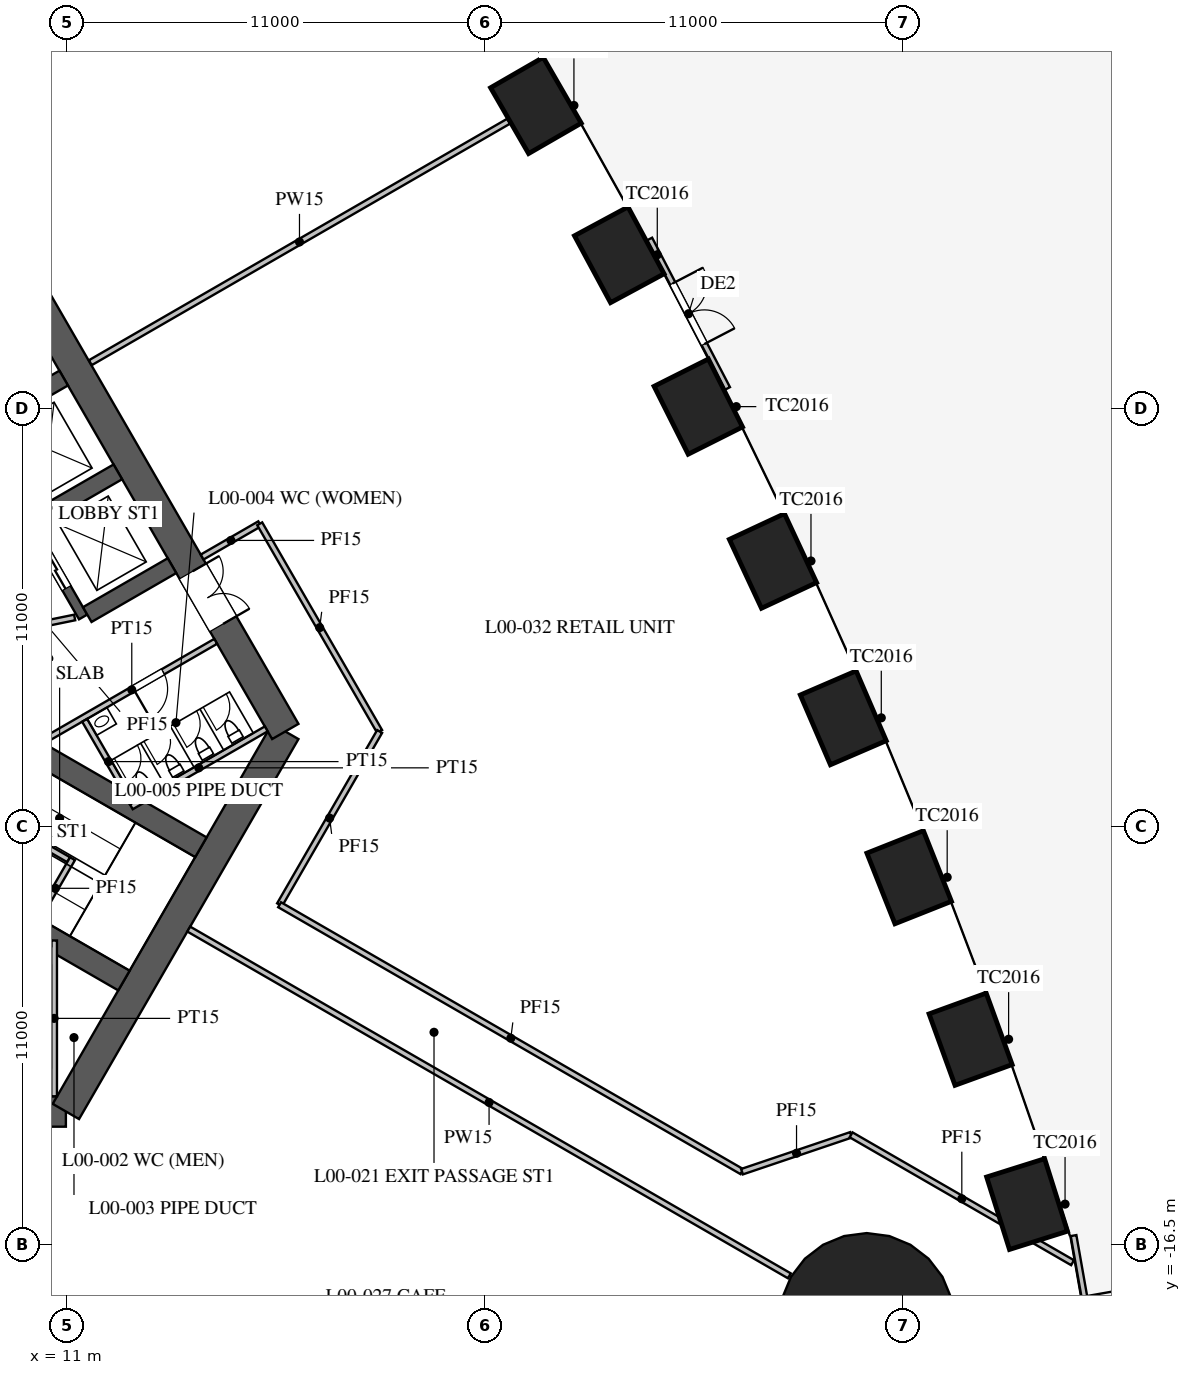
"""IFC4 building model, lengths in metres.
Left out: names, types, materials, properties, quantities, classifications, styles, units other than length and angle.
Written with IfcOpenShell. Run it as: python <this file> out.ifc"""

import sys

from ifc_helpers import new_model, si_unit, direction, frame, frame_2d, origin, origin_2d, place, context, subcontext, project, spatial, polyline, rectangle, circle, outline, extrude, element, fill, save


model = new_model("IFC4")
c1 = context("Model", 3, precision=1e-05, world=origin(), true_north=direction((0.0, 1.0)))
c2 = subcontext(c1, "Body", "Model", "MODEL_VIEW")
j1 = project(units=[si_unit("LENGTHUNIT", "METRE"), si_unit("PLANEANGLEUNIT", "RADIAN")], contexts=[c1])
p1 = place(None, origin())
s1 = spatial("IfcSite", under=j1, at=p1, CompositionType="ELEMENT")
p2 = place(p1, origin())
s2 = spatial("IfcBuilding", under=s1, at=p2, CompositionType="ELEMENT")
p3 = place(p2, origin())
s3 = spatial("IfcBuildingStorey", under=s2, at=p3, CompositionType="ELEMENT", Elevation=0.0)
for number, where, z_axis, x_axis in (
    (1, (36.262, -15.438, 0.0), (0.0, 0.0, 1.0), (-0.3, 0.954, 0.0)),
    (2, (34.776, -11.099, 0.0), (0.0, 0.0, 1.0), (-0.342, 0.94, 0.0)),
    (3, (33.16, -6.836, 0.0), (0.0, 0.0, 1.0), (-0.369, 0.929, 0.0)),
    (4, (31.426, -2.641, 0.0), (0.0, 0.0, 1.0), (-0.396, 0.918, 0.0)),
    (5, (29.576, 1.487, 0.0), (0.0, 0.0, 1.0), (-0.423, 0.906, 0.0)),
    (6, (27.611, 5.549, 0.0), (0.0, 0.0, 1.0), (-0.449, 0.894, 0.0)),
    (7, (25.531, 9.544, 0.0), (0.0, 0.0, 1.0), (-0.475, 0.88, 0.0)),
    (8, (23.338, 13.474, 0.0), (0.0, 0.0, 1.0), (-0.5, 0.866, 0.0)),
):
    element("IfcColumn", number, at=place(p3, frame(where, z_axis=z_axis, x_axis=x_axis)), inside=s3, PredefinedType="COLUMN", context=c2, shape_type="SweptSolid", body=[
        extrude(rectangle(XDim=2.0, YDim=1.6, at=origin_2d()), origin(), (0.0, 0.0, 1.0), 6.5),
    ])
p4 = place(p3, frame((32.043, -18.5, 0.0), z_axis=(0.0, 0.0, 1.0), x_axis=(1.0, 0.0, 0.0)))
e9 = element("IfcColumn", 9, at=p4, inside=s3, PredefinedType="COLUMN", context=c2, shape_type="SweptSolid", body=[
    extrude(circle(Radius=2.3, at=origin_2d()), origin(), (0.0, 0.0, 1.0), 6.5),
])
p5 = place(p3, frame((-10.97, -13.0, 0.0), z_axis=(0.0, 0.0, 1.0), x_axis=(1.0, 0.0, 0.0)))
e10 = element("IfcWall", 10, at=p5, inside=s3, PredefinedType="SHEAR", context=c2, shape_type="SweptSolid", body=[
    extrude(rectangle(XDim=21.939, YDim=0.8, at=frame_2d((10.97, 0.0))), origin(), (0.0, 0.0, 1.0), 6.5),
])
p6 = place(p5, frame((16.97, 0.0, 0.0)))
e11 = element("IfcOpeningElement", 11, at=p6, cuts=e10, PredefinedType="OPENING", context=c2, shape_type="SweptSolid", body=[
    extrude(rectangle(XDim=1.8, YDim=2.1, at=frame_2d((0.9, 1.05))), frame((0.0, 0.41, 0.0), z_axis=(0.0, -1.0, 0.0), x_axis=(1.0, 0.0, 0.0)), (0.0, 0.0, 1.0), 0.82),
])
p7 = place(p5, frame((3.27, 0.0, 0.0)))
e12 = element("IfcOpeningElement", 12, at=p7, cuts=e10, PredefinedType="OPENING", context=c2, shape_type="SweptSolid", body=[
    extrude(rectangle(XDim=1.6, YDim=2.1, at=frame_2d((0.8, 1.05))), frame((0.0, 0.41, 0.0), z_axis=(0.0, -1.0, 0.0), x_axis=(1.0, 0.0, 0.0)), (0.0, 0.0, 1.0), 0.82),
])
p8 = place(p3, frame((10.97, -13.0, 0.0), z_axis=(0.0, 0.0, 1.0), x_axis=(0.499995765644, 0.866027848477, 0.0)))
e13 = element("IfcWall", 13, at=p8, inside=s3, PredefinedType="SHEAR", context=c2, shape_type="SweptSolid", body=[
    extrude(rectangle(XDim=11.547, YDim=0.8, at=frame_2d((5.773, 0.0))), origin(), (0.0, 0.0, 1.0), 6.5),
])
p9 = place(p3, frame((16.743, -3.0, 0.0), z_axis=(0.0, 0.0, 1.0), x_axis=(-0.500002442456, 0.866023993627, 0.0)))
e14 = element("IfcWall", 14, at=p9, inside=s3, PredefinedType="SHEAR", context=c2, shape_type="SweptSolid", body=[
    extrude(rectangle(XDim=21.939, YDim=0.8, at=frame_2d((10.97, 0.0))), origin(), (0.0, 0.0, 1.0), 6.5),
])
p10 = place(p9, frame((17.27, 0.0, 0.0)))
e15 = element("IfcOpeningElement", 15, at=p10, cuts=e14, PredefinedType="OPENING", context=c2, shape_type="SweptSolid", body=[
    extrude(rectangle(XDim=1.2, YDim=2.1, at=frame_2d((0.6, 1.05))), frame((0.0, 0.41, 0.0), z_axis=(0.0, -1.0, 0.0), x_axis=(1.0, 0.0, 0.0)), (0.0, 0.0, 1.0), 0.82),
])
p11 = place(p9, frame((3.27, 0.0, 0.0)))
e16 = element("IfcOpeningElement", 16, at=p11, cuts=e14, PredefinedType="OPENING", context=c2, shape_type="SweptSolid", body=[
    extrude(rectangle(XDim=1.6, YDim=2.1, at=frame_2d((0.8, 1.05))), frame((0.0, 0.41, 0.0), z_axis=(0.0, -1.0, 0.0), x_axis=(1.0, 0.0, 0.0)), (0.0, 0.0, 1.0), 0.82),
])
p12 = place(p3, frame((11.424, 0.014, 0.0), z_axis=(0.0, 0.0, 1.0), x_axis=(-0.500001763848, 0.866024385424, 0.0)))
e17 = element("IfcWall", 17, at=p12, inside=s3, PredefinedType="SHEAR", context=c2, shape_type="SweptSolid", body=[
    extrude(rectangle(XDim=11.4, YDim=0.25, at=frame_2d((5.7, 0.0))), origin(), (0.0, 0.0, 1.0), 6.5),
])
p13 = place(p12, frame((0.875, 0.0, 0.0)))
e18 = element("IfcOpeningElement", 18, at=p13, cuts=e17, PredefinedType="OPENING", context=c2, shape_type="SweptSolid", body=[
    extrude(rectangle(XDim=1.1, YDim=2.2, at=frame_2d((0.55, 1.1))), frame((0.0, 0.135, 0.0), z_axis=(0.0, -1.0, 0.0), x_axis=(1.0, 0.0, 0.0)), (0.0, 0.0, 1.0), 0.27),
])
p14 = place(p12, frame((3.725, 0.0, 0.0)))
e19 = element("IfcOpeningElement", 19, at=p14, cuts=e17, PredefinedType="OPENING", context=c2, shape_type="SweptSolid", body=[
    extrude(rectangle(XDim=1.1, YDim=2.2, at=frame_2d((0.55, 1.1))), frame((0.0, 0.135, 0.0), z_axis=(0.0, -1.0, 0.0), x_axis=(1.0, 0.0, 0.0)), (0.0, 0.0, 1.0), 0.27),
])
p15 = place(p12, frame((6.575, 0.0, 0.0)))
e20 = element("IfcOpeningElement", 20, at=p15, cuts=e17, PredefinedType="OPENING", context=c2, shape_type="SweptSolid", body=[
    extrude(rectangle(XDim=1.1, YDim=2.2, at=frame_2d((0.55, 1.1))), frame((0.0, 0.135, 0.0), z_axis=(0.0, -1.0, 0.0), x_axis=(1.0, 0.0, 0.0)), (0.0, 0.0, 1.0), 0.27),
])
p16 = place(p12, frame((9.425, 0.0, 0.0)))
e21 = element("IfcOpeningElement", 21, at=p16, cuts=e17, PredefinedType="OPENING", context=c2, shape_type="SweptSolid", body=[
    extrude(rectangle(XDim=1.1, YDim=2.2, at=frame_2d((0.55, 1.1))), frame((0.0, 0.135, 0.0), z_axis=(0.0, -1.0, 0.0), x_axis=(1.0, 0.0, 0.0)), (0.0, 0.0, 1.0), 0.27),
])
for number, where, z_axis, x_axis in (
    (22, (11.532, 0.076, 0.0), (0.0, 0.0, 1.0), (0.866, 0.5, 0.0)),
    (23, (10.107, 2.544, 0.0), (0.0, 0.0, 1.0), (0.866, 0.5, 0.0)),
    (24, (8.682, 5.012, 0.0), (0.0, 0.0, 1.0), (0.866, 0.5, 0.0)),
):
    element("IfcWall", number, at=place(p3, frame(where, z_axis=z_axis, x_axis=x_axis)), inside=s3, PredefinedType="SHEAR", context=c2, shape_type="SweptSolid", body=[
        extrude(rectangle(XDim=2.575, YDim=0.45, at=frame_2d((1.288, 0.0))), origin(), (0.0, 0.0, 1.0), 6.5),
    ])
p17 = place(p3, frame((4.638, -5.016, 0.0), z_axis=(0.0, 0.0, 1.0), x_axis=(0.866019375473, -0.500010441196, 0.0)))
e25 = element("IfcWall", 25, at=p17, inside=s3, PredefinedType="SHEAR", context=c2, shape_type="SweptSolid", body=[
    extrude(rectangle(XDim=9.075, YDim=0.6, at=frame_2d((4.538, 0.0))), origin(), (0.0, 0.0, 1.0), 6.5),
])
p18 = place(p3, frame((6.663, -1.509, 0.0), z_axis=(0.0, 0.0, 1.0), x_axis=(0.866019375473, -0.500010441196, 0.0)))
e26 = element("IfcWall", 26, at=p18, inside=s3, PredefinedType="SHEAR", context=c2, shape_type="SweptSolid", body=[
    extrude(rectangle(XDim=9.075, YDim=0.6, at=frame_2d((4.538, 0.0))), origin(), (0.0, 0.0, 1.0), 6.5),
])
p19 = place(p18, frame((0.265, 0.0, 0.0)))
e27 = element("IfcOpeningElement", 27, at=p19, cuts=e26, PredefinedType="OPENING", context=c2, shape_type="SweptSolid", body=[
    extrude(rectangle(XDim=1.6, YDim=2.1, at=frame_2d((0.8, 1.05))), frame((0.0, 0.31, 0.0), z_axis=(0.0, -1.0, 0.0), x_axis=(1.0, 0.0, 0.0)), (0.0, 0.0, 1.0), 0.62),
])
p20 = place(p3, frame((38.107, -19.79, 0.0), z_axis=(0.0, 0.0, 1.0), x_axis=(-0.173652987794, 0.984806904845, 0.0)))
e28 = element("IfcWall", 28, at=p20, inside=s3, PredefinedType="SOLIDWALL", context=c2, shape_type="SweptSolid", body=[
    extrude(rectangle(XDim=3.578, YDim=0.15, at=frame_2d((1.789, 0.0))), origin(), (0.0, 0.0, 1.0), 6.48),
])
p21 = place(p20, frame((0.35, 0.0, 0.0)))
e29 = element("IfcOpeningElement", 29, at=p21, cuts=e28, PredefinedType="OPENING", context=c2, shape_type="SweptSolid", body=[
    extrude(rectangle(XDim=1.6, YDim=2.4, at=frame_2d((0.8, 1.2))), frame((0.0, 0.085, 0.0), z_axis=(0.0, -1.0, 0.0), x_axis=(1.0, 0.0, 0.0)), (0.0, 0.0, 1.0), 0.17),
])
p22 = place(p3, frame((28.377, 6.027, 0.0), z_axis=(0.0, 0.0, 1.0), x_axis=(-0.461820728931, 0.886973288397, 0.0)))
e30 = element("IfcWall", 30, at=p22, inside=s3, PredefinedType="SOLIDWALL", context=c2, shape_type="SweptSolid", body=[
    extrude(rectangle(XDim=4.434, YDim=0.15, at=frame_2d((2.217, 0.0))), origin(), (0.0, 0.0, 1.0), 6.48),
])
p23 = place(p22, frame((1.317, 0.0, 0.0)))
e31 = element("IfcOpeningElement", 31, at=p23, cuts=e30, PredefinedType="OPENING", context=c2, shape_type="SweptSolid", body=[
    extrude(rectangle(XDim=1.8, YDim=3.0, at=frame_2d((0.9, 1.5))), frame((0.0, 0.085, 0.0), z_axis=(0.0, -1.0, 0.0), x_axis=(1.0, 0.0, 0.0)), (0.0, 0.0, 1.0), 0.17),
])
p24 = place(p3, frame((10.495, -3.178, 0.0), z_axis=(0.0, 0.0, 1.0), x_axis=(0.86602216432, 0.500005610874, 0.0)))
e32 = element("IfcWall", 32, at=p24, inside=s3, PredefinedType="PARTITIONING", context=c2, shape_type="SweptSolid", body=[
    extrude(rectangle(XDim=5.1, YDim=0.15, at=frame_2d((2.55, 0.0))), origin(), (0.0, 0.0, 1.0), 6.3),
])
p25 = place(p24, frame((2.6, 0.0, 0.0)))
e33 = element("IfcOpeningElement", 33, at=p25, cuts=e32, PredefinedType="OPENING", context=c2, shape_type="SweptSolid", body=[
    extrude(rectangle(XDim=0.9, YDim=2.1, at=frame_2d((0.45, 1.05))), frame((0.0, 0.085, 0.0), z_axis=(0.0, -1.0, 0.0), x_axis=(1.0, 0.0, 0.0)), (0.0, 0.0, 1.0), 0.17),
])
for number, where, z_axis, x_axis in (
    (34, (10.66, -8.5, 0.0), (0.0, 0.0, 1.0), (0.0, -1.0, 0.0)),
    (35, (12.691, -4.982, 0.0), (0.0, 0.0, 1.0), (0.866, 0.5, 0.0)),
):
    element("IfcWall", number, at=place(p3, frame(where, z_axis=z_axis, x_axis=x_axis)), inside=s3, PredefinedType="PARTITIONING", context=c2, shape_type="SweptSolid", body=[
        extrude(rectangle(XDim=4.1, YDim=0.15, at=frame_2d((2.05, 0.0))), origin(), (0.0, 0.0, 1.0), 6.3),
    ])
p26 = place(p3, frame((11.464, -2.706, 0.0), z_axis=(0.0, 0.0, 1.0), x_axis=(0.50001992892, -0.866013897511, 0.0)))
e36 = element("IfcWall", 36, at=p26, inside=s3, PredefinedType="PARTITIONING", context=c2, shape_type="SweptSolid", body=[
    extrude(rectangle(XDim=2.51, YDim=0.15, at=frame_2d((1.255, 0.0))), origin(), (0.0, 0.0, 1.0), 6.3),
])
p27 = place(p3, frame((14.203, -8.2, 0.0), z_axis=(0.0, 0.0, 1.0), x_axis=(0.866024965723, -0.500000758745, 0.0)))
e37 = element("IfcWall", 37, at=p27, inside=s3, PredefinedType="PARTITIONING", context=c2, shape_type="SweptSolid", body=[
    extrude(rectangle(XDim=18.25, YDim=0.15, at=frame_2d((9.125, 0.0))), origin(), (0.0, 0.0, 1.0), 4.6),
])
p28 = place(p3, frame((11.613, 6.705, 0.0), z_axis=(0.0, 0.0, 1.0), x_axis=(0.866029791586, 0.499992400027, 0.0)))
e38 = element("IfcWall", 38, at=p28, inside=s3, PredefinedType="PARTITIONING", context=c2, shape_type="SweptSolid", body=[
    extrude(rectangle(XDim=12.709, YDim=0.15, at=frame_2d((6.354, 0.0))), origin(), (0.0, 0.0, 1.0), 5.4),
])
p29 = place(p3, frame((5.867, -3.387, 0.0), z_axis=(0.0, 0.0, 1.0), x_axis=(0.866014108153, -0.500019564097, 0.0)))
e39 = element("IfcWall", 39, at=p29, inside=s3, PredefinedType="PARTITIONING", context=c2, shape_type="SweptSolid", body=[
    extrude(outline(polyline([(0.0, 0.0), (5.975, 0.0), (5.975, 4.014), (1.966, 6.3), (0.0, 6.3), (0.0, 0.0)])), frame((0.0, 0.075, 0.0), z_axis=(0.0, -1.0, 0.0), x_axis=(1.0, 0.0, 0.0)), (0.0, 0.0, 1.0), 0.15),
])
p30 = place(p3, frame((10.244, -7.906, 0.0), z_axis=(0.0, 0.0, 1.0), x_axis=(0.499961193289, 0.866047807691, 0.0)))
e40 = element("IfcWall", 40, at=p30, inside=s3, PredefinedType="PARTITIONING", context=c2, shape_type="SweptSolid", body=[
    extrude(rectangle(XDim=1.8, YDim=0.15, at=frame_2d((0.9, 0.0))), origin(), (0.0, 0.0, 1.0), 3.575),
])
p31 = place(p3, frame((9.651, -0.317, 0.0), z_axis=(0.0, 0.0, 1.0), x_axis=(0.979710109184, 0.200419814298, 0.0)))
e41 = element("IfcWall", 41, at=p31, inside=s3, PredefinedType="PARTITIONING", context=c2, shape_type="SweptSolid", body=[
    extrude(rectangle(XDim=1.581, YDim=0.15, at=frame_2d((0.791, 0.0))), origin(), (0.0, 0.0, 1.0), 6.3),
])
p32 = place(p3, frame((14.555, 1.59, 0.0), z_axis=(0.0, 0.0, 1.0), x_axis=(0.866036909293, 0.499980071345, 0.0)))
e42 = element("IfcWall", 42, at=p32, inside=s3, PredefinedType="PARTITIONING", context=c2, shape_type="SweptSolid", body=[
    extrude(rectangle(XDim=1.75, YDim=0.15, at=frame_2d((0.875, 0.0))), origin(), (0.0, 0.0, 1.0), 6.3),
])
p33 = place(p3, frame((16.07, 2.465, 0.0), z_axis=(0.0, 0.0, 1.0), x_axis=(0.500012675527, -0.866018085442, 0.0)))
e43 = element("IfcWall", 43, at=p33, inside=s3, PredefinedType="PARTITIONING", context=c2, shape_type="SweptSolid", body=[
    extrude(rectangle(XDim=6.311, YDim=0.15, at=frame_2d((3.155, 0.0))), origin(), (0.0, 0.0, 1.0), 6.3),
])
p34 = place(p3, frame((19.226, -3.0, 0.0), z_axis=(0.0, 0.0, 1.0), x_axis=(-0.500014132739, -0.86601724409, 0.0)))
e44 = element("IfcWall", 44, at=p34, inside=s3, PredefinedType="PARTITIONING", context=c2, shape_type="SweptSolid", body=[
    extrude(rectangle(XDim=5.265, YDim=0.15, at=frame_2d((2.632, 0.0))), origin(), (0.0, 0.0, 1.0), 6.3),
])
p35 = place(p3, frame((16.593, -7.56, 0.0), z_axis=(0.0, 0.0, 1.0), x_axis=(0.86602961784, -0.499992700971, 0.0)))
e45 = element("IfcWall", 45, at=p35, inside=s3, PredefinedType="PARTITIONING", context=c2, shape_type="SweptSolid", body=[
    extrude(rectangle(XDim=14.05, YDim=0.15, at=frame_2d((7.025, 0.0))), origin(), (0.0, 0.0, 1.0), 6.3),
])
p36 = place(p3, frame((28.761, -14.584, 0.0), z_axis=(0.0, 0.0, 1.0), x_axis=(0.947320595797, 0.32028688512, 0.0)))
e46 = element("IfcWall", 46, at=p36, inside=s3, PredefinedType="PARTITIONING", context=c2, shape_type="SweptSolid", body=[
    extrude(rectangle(XDim=3.029, YDim=0.15, at=frame_2d((1.515, 0.0))), origin(), (0.0, 0.0, 1.0), 5.7),
])
p37 = place(p3, frame((31.631, -13.614, 0.0), z_axis=(0.0, 0.0, 1.0), x_axis=(0.866020068361, -0.500009241111, 0.0)))
e47 = element("IfcWall", 47, at=p37, inside=s3, PredefinedType="PARTITIONING", context=c2, shape_type="SweptSolid", body=[
    extrude(rectangle(XDim=6.73, YDim=0.15, at=frame_2d((3.365, 0.0))), origin(), (0.0, 0.0, 1.0), 6.3),
])
p38 = place(p23, frame((1.8, 0.0, 0.0), z_axis=(0.0, 0.0, 1.0), x_axis=(-1.0, 0.0, 0.0)))
e48 = element("IfcDoor", 48, at=p38, inside=s3, OperationType="DOUBLE_DOOR_SINGLE_SWING", PredefinedType="DOOR", context=c2, shape_type="SweptSolid", body=[
    extrude(rectangle(XDim=1.8, YDim=3.0, at=frame_2d((0.9, 1.5))), frame((0.0, 0.025, 0.0), z_axis=(0.0, -1.0, 0.0), x_axis=(1.0, 0.0, 0.0)), (0.0, 0.0, 1.0), 0.05),
])
fill(e31, e48)
p39 = place(p25, frame((0.9, 0.0, 0.0), z_axis=(0.0, 0.0, 1.0), x_axis=(-1.0, 0.0, 0.0)))
e49 = element("IfcDoor", 49, at=p39, inside=s3, OperationType="SINGLE_SWING_RIGHT", PredefinedType="DOOR", context=c2, shape_type="SweptSolid", body=[
    extrude(rectangle(XDim=0.9, YDim=2.1, at=frame_2d((0.45, 1.05))), frame((0.0, 0.025, 0.0), z_axis=(0.0, -1.0, 0.0), x_axis=(1.0, 0.0, 0.0)), (0.0, 0.0, 1.0), 0.05),
])
fill(e33, e49)
p40 = place(p11, frame((1.6, 0.0, 0.0), z_axis=(0.0, 0.0, 1.0), x_axis=(-1.0, 0.0, 0.0)))
e50 = element("IfcDoor", 50, at=p40, inside=s3, OperationType="DOUBLE_DOOR_SINGLE_SWING", PredefinedType="DOOR", context=c2, shape_type="SweptSolid", body=[
    extrude(rectangle(XDim=1.6, YDim=2.1, at=frame_2d((0.8, 1.05))), frame((0.0, 0.025, 0.0), z_axis=(0.0, -1.0, 0.0), x_axis=(1.0, 0.0, 0.0)), (0.0, 0.0, 1.0), 0.05),
])
fill(e16, e50)
p41 = place(p13, origin())
e51 = element("IfcDoor", 51, at=p41, inside=s3, OperationType="DOUBLE_DOOR_SLIDING", PredefinedType="DOOR", context=c2, shape_type="SweptSolid", body=[
    extrude(rectangle(XDim=1.1, YDim=2.2, at=frame_2d((0.55, 1.1))), frame((0.0, 0.025, 0.0), z_axis=(0.0, -1.0, 0.0), x_axis=(1.0, 0.0, 0.0)), (0.0, 0.0, 1.0), 0.05),
])
fill(e18, e51)
save(model, sys.argv[1])
